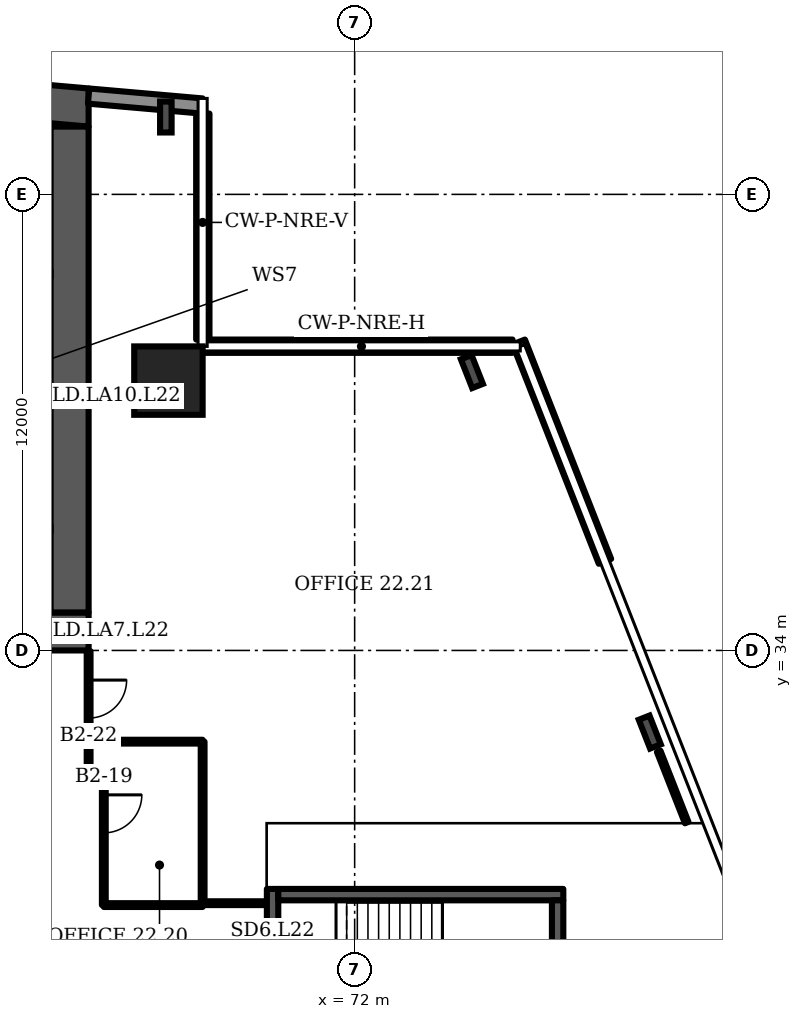
"""IFC4 building model, lengths in metres.
Left out: names, types, materials, properties, quantities, classifications, styles, units other than length and angle.
Written with IfcOpenShell. Run it as: python <this file> out.ifc"""

import sys

from ifc_helpers import new_model, si_unit, direction, frame, frame_2d, origin, origin_2d, place, context, subcontext, project, spatial, polyline, rectangle, i_section, outline, extrude, element, fill, save


model = new_model("IFC4")
c1 = context("Model", 3, precision=1e-05, world=origin(), true_north=direction((0.0, 1.0)))
c2 = subcontext(c1, "Body", "Model", "MODEL_VIEW")
j1 = project(units=[si_unit("LENGTHUNIT", "METRE"), si_unit("PLANEANGLEUNIT", "RADIAN")], contexts=[c1])
p1 = place(None, origin())
s1 = spatial("IfcSite", under=j1, at=p1, CompositionType="ELEMENT")
p2 = place(p1, origin())
s2 = spatial("IfcBuilding", under=s1, at=p2, CompositionType="ELEMENT")
p3 = place(p2, frame((0.0, 0.0, 100.3)))
s3 = spatial("IfcBuildingStorey", under=s2, at=p3, CompositionType="ELEMENT", Elevation=100.3)
p4 = place(p3, frame((0.0, 0.0, -0.0)))
e1 = element("IfcWall", 1, at=p4, inside=s3, PredefinedType="SHEAR", context=c2, shape_type="SweptSolid", body=[
    extrude(outline(polyline([(16.0, 47.784), (40.5, 49.927), (65.0, 47.784), (65.0, 48.787), (40.5, 50.931), (16.0, 48.787), (16.0, 47.784)])), origin(), (0.0, 0.0, 1.0), 3.6),
])
p5 = place(p3, frame((16.0, 34.5, 0.0), z_axis=(0.0, 0.0, 1.0), x_axis=(1.0, 0.0, 0.0)))
e2 = element("IfcWall", 2, at=p5, inside=s3, PredefinedType="SHEAR", context=c2, shape_type="SweptSolid", body=[
    extrude(rectangle(XDim=49.0, YDim=1.0, at=frame_2d((24.5, 0.0))), origin(), (0.0, 0.0, 1.0), 3.6),
])
p6 = place(p5, frame((1.2, 0.0, 0.0)))
e3 = element("IfcOpeningElement", 3, at=p6, cuts=e2, PredefinedType="OPENING", context=c2, shape_type="SweptSolid", body=[
    extrude(rectangle(XDim=1.1, YDim=2.1, at=frame_2d((0.55, 1.05))), frame((0.0, 0.51, 0.0), z_axis=(0.0, -1.0, 0.0), x_axis=(1.0, 0.0, 0.0)), (0.0, 0.0, 1.0), 1.02),
])
p7 = place(p5, frame((5.083, 0.0, 0.0)))
e4 = element("IfcOpeningElement", 4, at=p7, cuts=e2, PredefinedType="OPENING", context=c2, shape_type="SweptSolid", body=[
    extrude(rectangle(XDim=1.1, YDim=2.1, at=frame_2d((0.55, 1.05))), frame((0.0, 0.51, 0.0), z_axis=(0.0, -1.0, 0.0), x_axis=(1.0, 0.0, 0.0)), (0.0, 0.0, 1.0), 1.02),
])
p8 = place(p5, frame((2.933, 0.0, 0.0)))
e5 = element("IfcOpeningElement", 5, at=p8, cuts=e2, PredefinedType="OPENING", context=c2, shape_type="SweptSolid", body=[
    extrude(rectangle(XDim=1.4, YDim=2.1, at=frame_2d((0.7, 1.05))), frame((0.0, 0.51, 0.0), z_axis=(0.0, -1.0, 0.0), x_axis=(1.0, 0.0, 0.0)), (0.0, 0.0, 1.0), 1.02),
])
p9 = place(p5, frame((7.65, 0.0, 0.0)))
e6 = element("IfcOpeningElement", 6, at=p9, cuts=e2, PredefinedType="OPENING", context=c2, shape_type="SweptSolid", body=[
    extrude(rectangle(XDim=1.2, YDim=2.1, at=frame_2d((0.6, 1.05))), frame((0.0, 0.51, 0.0), z_axis=(0.0, -1.0, 0.0), x_axis=(1.0, 0.0, 0.0)), (0.0, 0.0, 1.0), 1.02),
])
p10 = place(p5, frame((14.817, 0.0, 0.0)))
e7 = element("IfcOpeningElement", 7, at=p10, cuts=e2, PredefinedType="OPENING", context=c2, shape_type="SweptSolid", body=[
    extrude(rectangle(XDim=1.1, YDim=2.1, at=frame_2d((0.55, 1.05))), frame((0.0, 0.51, 0.0), z_axis=(0.0, -1.0, 0.0), x_axis=(1.0, 0.0, 0.0)), (0.0, 0.0, 1.0), 1.02),
])
p11 = place(p5, frame((19.083, 0.0, 0.0)))
e8 = element("IfcOpeningElement", 8, at=p11, cuts=e2, PredefinedType="OPENING", context=c2, shape_type="SweptSolid", body=[
    extrude(rectangle(XDim=1.1, YDim=2.1, at=frame_2d((0.55, 1.05))), frame((0.0, 0.51, 0.0), z_axis=(0.0, -1.0, 0.0), x_axis=(1.0, 0.0, 0.0)), (0.0, 0.0, 1.0), 1.02),
])
p12 = place(p5, frame((16.8, 0.0, 0.0)))
e9 = element("IfcOpeningElement", 9, at=p12, cuts=e2, PredefinedType="OPENING", context=c2, shape_type="SweptSolid", body=[
    extrude(rectangle(XDim=1.4, YDim=2.1, at=frame_2d((0.7, 1.05))), frame((0.0, 0.51, 0.0), z_axis=(0.0, -1.0, 0.0), x_axis=(1.0, 0.0, 0.0)), (0.0, 0.0, 1.0), 1.02),
])
p13 = place(p5, frame((21.817, 0.0, 0.0)))
e10 = element("IfcOpeningElement", 10, at=p13, cuts=e2, PredefinedType="OPENING", context=c2, shape_type="SweptSolid", body=[
    extrude(rectangle(XDim=1.1, YDim=2.1, at=frame_2d((0.55, 1.05))), frame((0.0, 0.51, 0.0), z_axis=(0.0, -1.0, 0.0), x_axis=(1.0, 0.0, 0.0)), (0.0, 0.0, 1.0), 1.02),
])
p14 = place(p5, frame((26.083, 0.0, 0.0)))
e11 = element("IfcOpeningElement", 11, at=p14, cuts=e2, PredefinedType="OPENING", context=c2, shape_type="SweptSolid", body=[
    extrude(rectangle(XDim=1.1, YDim=2.1, at=frame_2d((0.55, 1.05))), frame((0.0, 0.51, 0.0), z_axis=(0.0, -1.0, 0.0), x_axis=(1.0, 0.0, 0.0)), (0.0, 0.0, 1.0), 1.02),
])
p15 = place(p5, frame((33.15, 0.0, 0.0)))
e12 = element("IfcOpeningElement", 12, at=p15, cuts=e2, PredefinedType="OPENING", context=c2, shape_type="SweptSolid", body=[
    extrude(rectangle(XDim=1.2, YDim=2.1, at=frame_2d((0.6, 1.05))), frame((0.0, 0.51, 0.0), z_axis=(0.0, -1.0, 0.0), x_axis=(1.0, 0.0, 0.0)), (0.0, 0.0, 1.0), 1.02),
])
p16 = place(p5, frame((37.8, 0.0, 0.0)))
e13 = element("IfcOpeningElement", 13, at=p16, cuts=e2, PredefinedType="OPENING", context=c2, shape_type="SweptSolid", body=[
    extrude(rectangle(XDim=1.4, YDim=2.1, at=frame_2d((0.7, 1.05))), frame((0.0, 0.51, 0.0), z_axis=(0.0, -1.0, 0.0), x_axis=(1.0, 0.0, 0.0)), (0.0, 0.0, 1.0), 1.02),
])
p17 = place(p5, frame((42.817, 0.0, 0.0)))
e14 = element("IfcOpeningElement", 14, at=p17, cuts=e2, PredefinedType="OPENING", context=c2, shape_type="SweptSolid", body=[
    extrude(rectangle(XDim=1.1, YDim=2.1, at=frame_2d((0.55, 1.05))), frame((0.0, 0.51, 0.0), z_axis=(0.0, -1.0, 0.0), x_axis=(1.0, 0.0, 0.0)), (0.0, 0.0, 1.0), 1.02),
])
p18 = place(p5, frame((46.7, 0.0, 0.0)))
e15 = element("IfcOpeningElement", 15, at=p18, cuts=e2, PredefinedType="OPENING", context=c2, shape_type="SweptSolid", body=[
    extrude(rectangle(XDim=1.1, YDim=2.1, at=frame_2d((0.55, 1.05))), frame((0.0, 0.51, 0.0), z_axis=(0.0, -1.0, 0.0), x_axis=(1.0, 0.0, 0.0)), (0.0, 0.0, 1.0), 1.02),
])
p19 = place(p5, frame((44.667, 0.0, 0.0)))
e16 = element("IfcOpeningElement", 16, at=p19, cuts=e2, PredefinedType="OPENING", context=c2, shape_type="SweptSolid", body=[
    extrude(rectangle(XDim=1.4, YDim=2.1, at=frame_2d((0.7, 1.05))), frame((0.0, 0.51, 0.0), z_axis=(0.0, -1.0, 0.0), x_axis=(1.0, 0.0, 0.0)), (0.0, 0.0, 1.0), 1.02),
])
p20 = place(p3, frame((64.5, 35.0, 0.0), z_axis=(0.0, 0.0, 1.0), x_axis=(0.0, 1.0, 0.0)))
e17 = element("IfcWall", 17, at=p20, inside=s3, PredefinedType="SHEAR", context=c2, shape_type="SweptSolid", body=[
    extrude(rectangle(XDim=12.784, YDim=1.0, at=frame_2d((6.392, 0.0))), origin(), (0.0, 0.0, 1.0), 3.6),
])
p21 = place(p3, frame((67.1, 41.1, 0.0), z_axis=(0.0, 0.0, 1.0), x_axis=(1.0, 0.0, 0.0)))
e18 = element("IfcColumn", 18, at=p21, inside=s3, PredefinedType="COLUMN", context=c2, shape_type="SweptSolid", body=[
    extrude(rectangle(XDim=1.8, YDim=1.8, at=origin_2d()), origin(), (0.0, 0.0, 1.0), 3.6),
])
for number, where, z_axis, x_axis in (
    (19, (79.766, 31.853, 0.0), (0.0, 0.0, 1.0), (0.931, 0.366, 0.0)),
    (20, (75.085, 41.338, 0.0), (0.0, 0.0, 1.0), (0.931, 0.366, 0.0)),
    (21, (67.032, 48.036, 0.0), (0.0, 0.0, 1.0), (1.0, 0.0, 0.0)),
):
    element("IfcColumn", number, at=place(p3, frame(where, z_axis=z_axis, x_axis=x_axis)), inside=s3, PredefinedType="COLUMN", context=c2, shape_type="SweptSolid", body=[
        extrude(i_section(OverallWidth=0.303, OverallDepth=0.814, WebThickness=0.021, FlangeThickness=0.04, FilletRadius=0.03, at=origin_2d()), origin(), (0.0, 0.0, 1.0), 3.6),
    ])
p22 = place(p3, frame((67.983, 48.326, 0.0), z_axis=(0.0, 0.0, 1.0), x_axis=(-0.996194, 0.087168, 0.0)))
e22 = element("IfcWall", 22, at=p22, inside=s3, PredefinedType="SOLIDWALL", context=c2, shape_type="SweptSolid", body=[
    extrude(rectangle(XDim=2.994, YDim=0.4, at=frame_2d((1.497, 0.0))), origin(), (0.0, 0.0, 1.0), 3.2),
])
p23 = place(p3, frame((78.586, 36.344, 0.0), z_axis=(0.0, 0.0, 1.0), x_axis=(-0.365792, 0.930699, 0.0)))
e23 = element("IfcWall", 23, at=p23, inside=s3, PredefinedType="SOLIDWALL", context=c2, shape_type="SweptSolid", body=[
    extrude(rectangle(XDim=6.202, YDim=0.35, at=frame_2d((3.101, 0.0))), origin(), (0.0, 0.0, 1.0), 1.0),
])
p24 = place(p3, frame((76.155, 42.005, 0.0), z_axis=(0.0, 0.0, 1.0), x_axis=(-1.0, 0.0, 0.0)))
e24 = element("IfcWall", 24, at=p24, inside=s3, PredefinedType="SOLIDWALL", context=c2, shape_type="SweptSolid", body=[
    extrude(rectangle(XDim=8.155, YDim=0.35, at=frame_2d((4.078, 0.0))), origin(), (0.0, 0.0, 1.0), 1.0),
])
p25 = place(p3, frame((68.005, 42.18, 0.0), z_axis=(0.0, 0.0, 1.0), x_axis=(0.0, 1.0, 0.0)))
e25 = element("IfcWall", 25, at=p25, inside=s3, PredefinedType="SOLIDWALL", context=c2, shape_type="SweptSolid", body=[
    extrude(rectangle(XDim=5.947, YDim=0.35, at=frame_2d((2.973, 0.0))), origin(), (0.0, 0.0, 1.0), 1.0),
])
p26 = place(p3, frame((69.84, 23.375, 0.0), z_axis=(0.0, 0.0, 1.0), x_axis=(0.0, 1.0, 0.0)))
e26 = element("IfcWall", 26, at=p26, inside=s3, PredefinedType="SHEAR", context=c2, shape_type="SweptSolid", body=[
    extrude(rectangle(XDim=4.35, YDim=0.3, at=frame_2d((2.175, 0.0))), origin(), (0.0, 0.0, 1.0), 3.2),
])
p27 = place(p26, frame((1.575, 0.0, 0.0)))
e27 = element("IfcOpeningElement", 27, at=p27, cuts=e26, PredefinedType="OPENING", context=c2, shape_type="SweptSolid", body=[
    extrude(rectangle(XDim=1.2, YDim=2.1, at=frame_2d((0.6, 1.05))), frame((0.0, 0.16, 0.0), z_axis=(0.0, -1.0, 0.0), x_axis=(1.0, 0.0, 0.0)), (0.0, 0.0, 1.0), 0.32),
])
p28 = place(p3, frame((65.0, 30.56, 0.0), z_axis=(0.0, 0.0, 1.0), x_axis=(0.0, 1.0, 0.0)))
e28 = element("IfcWall", 28, at=p28, inside=s3, PredefinedType="PARTITIONING", context=c2, shape_type="SweptSolid", body=[
    extrude(rectangle(XDim=3.42, YDim=0.1, at=frame_2d((1.71, 0.0))), origin(), (0.0, 0.0, 1.0), 3.2),
])
p29 = place(p28, frame((1.66, 0.0, 0.0)))
e29 = element("IfcOpeningElement", 29, at=p29, cuts=e28, PredefinedType="OPENING", context=c2, shape_type="SweptSolid", body=[
    extrude(rectangle(XDim=1.0, YDim=2.1, at=frame_2d((0.5, 1.05))), frame((0.0, 0.06, 0.0), z_axis=(0.0, -1.0, 0.0), x_axis=(1.0, 0.0, 0.0)), (0.0, 0.0, 1.0), 0.12),
])
p30 = place(p3, frame((65.0, 31.6, 0.0), z_axis=(0.0, 0.0, 1.0), x_axis=(1.0, 0.0, 0.0)))
e30 = element("IfcWall", 30, at=p30, inside=s3, PredefinedType="PARTITIONING", context=c2, shape_type="SweptSolid", body=[
    extrude(rectangle(XDim=3.0, YDim=0.1, at=frame_2d((1.5, 0.0))), origin(), (0.0, 0.0, 1.0), 3.2),
])
p31 = place(p3, frame((65.395, 30.5, 0.0), z_axis=(0.0, 0.0, 1.0), x_axis=(-0.988637, 0.150312, 0.0)))
e31 = element("IfcWall", 31, at=p31, inside=s3, PredefinedType="PARTITIONING", context=c2, shape_type="SweptSolid", body=[
    extrude(rectangle(XDim=0.4, YDim=0.1, at=frame_2d((0.2, 0.0))), origin(), (0.0, 0.0, 1.0), 3.2),
])
p32 = place(p3, frame((65.4, 27.3, 0.0), z_axis=(0.0, 0.0, 1.0), x_axis=(0.0, 1.0, 0.0)))
e32 = element("IfcWall", 32, at=p32, inside=s3, PredefinedType="PARTITIONING", context=c2, shape_type="SweptSolid", body=[
    extrude(rectangle(XDim=3.2, YDim=0.1, at=frame_2d((1.6, 0.0))), origin(), (0.0, 0.0, 1.0), 3.2),
])
p33 = place(p32, frame((1.9, 0.0, 0.0)))
e33 = element("IfcOpeningElement", 33, at=p33, cuts=e32, PredefinedType="OPENING", context=c2, shape_type="SweptSolid", body=[
    extrude(rectangle(XDim=1.0, YDim=2.1, at=frame_2d((0.5, 1.05))), frame((0.0, 0.06, 0.0), z_axis=(0.0, -1.0, 0.0), x_axis=(1.0, 0.0, 0.0)), (0.0, 0.0, 1.0), 0.12),
])
p34 = place(p3, frame((65.4, 27.3, 0.0), z_axis=(0.0, 0.0, 1.0), x_axis=(1.0, 0.0, 0.0)))
e34 = element("IfcWall", 34, at=p34, inside=s3, PredefinedType="PARTITIONING", context=c2, shape_type="SweptSolid", body=[
    extrude(rectangle(XDim=2.6, YDim=0.1, at=frame_2d((1.3, 0.0))), origin(), (0.0, 0.0, 1.0), 3.2),
])
p35 = place(p3, frame((68.0, 27.3, 0.0), z_axis=(0.0, 0.0, 1.0), x_axis=(0.0, 1.0, 0.0)))
e35 = element("IfcWall", 35, at=p35, inside=s3, PredefinedType="PARTITIONING", context=c2, shape_type="SweptSolid", body=[
    extrude(rectangle(XDim=4.3, YDim=0.1, at=frame_2d((2.15, 0.0))), origin(), (0.0, 0.0, 1.0), 3.2),
])
p36 = place(p3, frame((68.05, 27.35, 0.0), z_axis=(0.0, 0.0, 1.0), x_axis=(1.0, 0.0, 0.0)))
e36 = element("IfcWall", 36, at=p36, inside=s3, PredefinedType="PARTITIONING", context=c2, shape_type="SweptSolid", body=[
    extrude(rectangle(XDim=1.62, YDim=0.1, at=frame_2d((0.81, 0.0))), origin(), (0.0, 0.0, 1.0), 3.2),
])
p37 = place(p3, frame((80.737, 29.47, 0.0), z_axis=(0.0, 0.0, 1.0), x_axis=(-0.365847, 0.930674, 0.0)))
e37 = element("IfcWall", 37, at=p37, inside=s3, PredefinedType="PARTITIONING", context=c2, shape_type="SweptSolid", body=[
    extrude(rectangle(XDim=2.015, YDim=0.1, at=frame_2d((1.007, 0.0))), origin(), (0.0, 0.0, 1.0), 2.58),
])
p38 = place(p3, frame((69.99, 27.575, 0.0), z_axis=(0.0, 0.0, 1.0), x_axis=(1.0, 0.0, 0.0)))
e38 = element("IfcWall", 38, at=p38, inside=s3, PredefinedType="SHEAR", context=c2, shape_type="SweptSolid", body=[
    extrude(rectangle(XDim=7.5, YDim=0.3, at=frame_2d((3.75, 0.0))), origin(), (0.0, 0.0, 1.0), 3.2),
])
p39 = place(p3, frame((77.34, 23.675, 0.0), z_axis=(0.0, 0.0, 1.0), x_axis=(0.0, 1.0, 0.0)))
e39 = element("IfcWall", 39, at=p39, inside=s3, PredefinedType="SHEAR", context=c2, shape_type="SweptSolid", body=[
    extrude(rectangle(XDim=3.75, YDim=0.3, at=frame_2d((1.875, 0.0))), origin(), (0.0, 0.0, 1.0), 3.2),
])
p40 = place(p33, origin())
e40 = element("IfcDoor", 40, at=p40, inside=s3, OperationType="SINGLE_SWING_RIGHT", PredefinedType="DOOR", context=c2, shape_type="SweptSolid", body=[
    extrude(rectangle(XDim=1.0, YDim=2.1, at=frame_2d((0.5, 1.05))), frame((0.0, 0.025, 0.0), z_axis=(0.0, -1.0, 0.0), x_axis=(1.0, 0.0, 0.0)), (0.0, 0.0, 1.0), 0.05),
])
fill(e33, e40)
p41 = place(p29, origin())
e41 = element("IfcDoor", 41, at=p41, inside=s3, OperationType="SINGLE_SWING_RIGHT", PredefinedType="DOOR", context=c2, shape_type="SweptSolid", body=[
    extrude(rectangle(XDim=1.0, YDim=2.1, at=frame_2d((0.5, 1.05))), frame((0.0, 0.025, 0.0), z_axis=(0.0, -1.0, 0.0), x_axis=(1.0, 0.0, 0.0)), (0.0, 0.0, 1.0), 0.05),
])
fill(e29, e41)
save(model, sys.argv[1])
